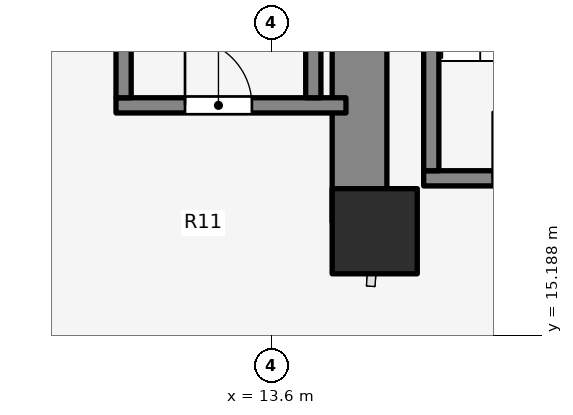
"""IFC4 building model, lengths in metres.
Left out: names, types, materials, properties, quantities, classifications, styles, units other than length and angle.
Written with IfcOpenShell. Run it as: python <this file> out.ifc"""

import sys

from ifc_helpers import new_model, si_unit, direction, frame, frame_2d, origin, origin_2d, place, context, subcontext, project, spatial, rectangle, extrude, element, fill, save


model = new_model("IFC4")
c1 = context("Model", 3, precision=1e-05, world=origin(), true_north=direction((0.0, 1.0)))
c2 = subcontext(c1, "Body", "Model", "MODEL_VIEW")
j1 = project(units=[si_unit("LENGTHUNIT", "METRE"), si_unit("PLANEANGLEUNIT", "RADIAN")], contexts=[c1])
p1 = place(None, origin())
s1 = spatial("IfcSite", under=j1, at=p1, CompositionType="ELEMENT")
p2 = place(p1, origin())
s2 = spatial("IfcBuilding", under=s1, at=p2, CompositionType="ELEMENT")
p3 = place(p2, frame((0.0, 0.0, 64.8)))
s3 = spatial("IfcBuildingStorey", under=s2, at=p3, CompositionType="ELEMENT", Elevation=64.8)
p4 = place(p3, frame((15.05, 17.05, 0.0), z_axis=(0.0, 0.0, 1.0), x_axis=(0.0, 1.0, 0.0)))
e1 = element("IfcWall", 1, at=p4, inside=s3, PredefinedType="SHEAR", context=c2, shape_type="SweptSolid", body=[
    extrude(rectangle(XDim=12.8, YDim=0.9, at=frame_2d((6.4, 0.0))), origin(), (0.0, 0.0, 1.0), 4.2),
])
p5 = place(p3, frame((16.105, 17.77, 0.0), z_axis=(0.0, 0.0, 1.0), x_axis=(1.0, 0.0, 0.0)))
e2 = element("IfcWall", 2, at=p5, inside=s3, PredefinedType="SOLIDWALL", context=c2, shape_type="SweptSolid", body=[
    extrude(rectangle(XDim=3.37, YDim=0.25, at=frame_2d((1.685, 0.0))), origin(), (0.0, 0.0, 1.0), 4.2),
])
p6 = place(p5, frame((1.135, 0.0, 0.0)))
e3 = element("IfcOpeningElement", 3, at=p6, cuts=e2, PredefinedType="OPENING", context=c2, shape_type="SweptSolid", body=[
    extrude(rectangle(XDim=1.1, YDim=2.1, at=frame_2d((0.55, 1.05))), frame((0.0, 0.135, 0.0), z_axis=(0.0, -1.0, 0.0), x_axis=(1.0, 0.0, 0.0)), (0.0, 0.0, 1.0), 0.27),
])
p7 = place(p3, frame((16.23, 17.895, 0.0), z_axis=(0.0, 0.0, 1.0), x_axis=(0.0, 1.0, 0.0)))
e4 = element("IfcWall", 4, at=p7, inside=s3, PredefinedType="SOLIDWALL", context=c2, shape_type="SweptSolid", body=[
    extrude(rectangle(XDim=7.81, YDim=0.25, at=frame_2d((3.905, 0.0))), origin(), (0.0, 0.0, 1.0), 4.2),
])
p8 = place(p3, frame((11.045, 18.97, 0.0), z_axis=(0.0, 0.0, 1.0), x_axis=(1.0, 0.0, 0.0)))
e5 = element("IfcWall", 5, at=p8, inside=s3, PredefinedType="SOLIDWALL", context=c2, shape_type="SweptSolid", body=[
    extrude(rectangle(XDim=3.782, YDim=0.25, at=frame_2d((1.891, 0.0))), origin(), (0.0, 0.0, 1.0), 4.2),
])
p9 = place(p8, frame((1.135, 0.0, 0.0)))
e6 = element("IfcOpeningElement", 6, at=p9, cuts=e5, PredefinedType="OPENING", context=c2, shape_type="SweptSolid", body=[
    extrude(rectangle(XDim=1.1, YDim=2.1, at=frame_2d((0.55, 1.05))), frame((0.0, 0.135, 0.0), z_axis=(0.0, -1.0, 0.0), x_axis=(1.0, 0.0, 0.0)), (0.0, 0.0, 1.0), 0.27),
])
for number, where, z_axis, x_axis in (
    (7, (11.17, 19.095, 0.0), (0.0, 0.0, 1.0), (0.0, 1.0, 0.0)),
    (8, (14.29, 19.095, 0.0), (0.0, 0.0, 1.0), (0.0, 1.0, 0.0)),
):
    element("IfcWall", number, at=place(p3, frame(where, z_axis=z_axis, x_axis=x_axis)), inside=s3, PredefinedType="SOLIDWALL", context=c2, shape_type="SweptSolid", body=[
        extrude(rectangle(XDim=7.81, YDim=0.25, at=frame_2d((3.905, 0.0))), origin(), (0.0, 0.0, 1.0), 4.2),
    ])
p10 = place(p3, frame((15.3, 16.9, 0.0), z_axis=(0.0, 0.0, 1.0), x_axis=(1.0, 0.0, 0.0)))
e9 = element("IfcColumn", 9, at=p10, inside=s3, PredefinedType="COLUMN", context=c2, shape_type="SweptSolid", body=[
    extrude(rectangle(XDim=1.4, YDim=1.4, at=origin_2d()), origin(), (0.0, 0.0, 1.0), 4.2),
])
p11 = place(p3, frame((7.674, 16.875, 0.0), z_axis=(0.0, 0.0, 1.0), x_axis=(0.58386496218, -0.81185079044, 0.0)))
e10 = element("IfcWall", 10, at=p11, inside=s3, PredefinedType="STANDARD", context=c2, shape_type="SweptSolid", body=[
    extrude(rectangle(XDim=5.032, YDim=0.26, at=frame_2d((2.516, 0.0))), origin(), (0.0, 0.0, 1.0), 2.32),
])
p12 = place(p6, origin())
e11 = element("IfcDoor", 11, at=p12, inside=s3, OperationType="SINGLE_SWING_LEFT", PredefinedType="DOOR", context=c2, shape_type="SweptSolid", body=[
    extrude(rectangle(XDim=1.1, YDim=2.1, at=frame_2d((0.55, 1.05))), frame((0.0, 0.025, 0.0), z_axis=(0.0, -1.0, 0.0), x_axis=(1.0, 0.0, 0.0)), (0.0, 0.0, 1.0), 0.05),
])
fill(e3, e11)
p13 = place(p9, origin())
e12 = element("IfcDoor", 12, at=p13, inside=s3, OperationType="SINGLE_SWING_LEFT", PredefinedType="DOOR", context=c2, shape_type="SweptSolid", body=[
    extrude(rectangle(XDim=1.1, YDim=2.1, at=frame_2d((0.55, 1.05))), frame((0.0, 0.025, 0.0), z_axis=(0.0, -1.0, 0.0), x_axis=(1.0, 0.0, 0.0)), (0.0, 0.0, 1.0), 0.05),
])
fill(e6, e12)
save(model, sys.argv[1])
